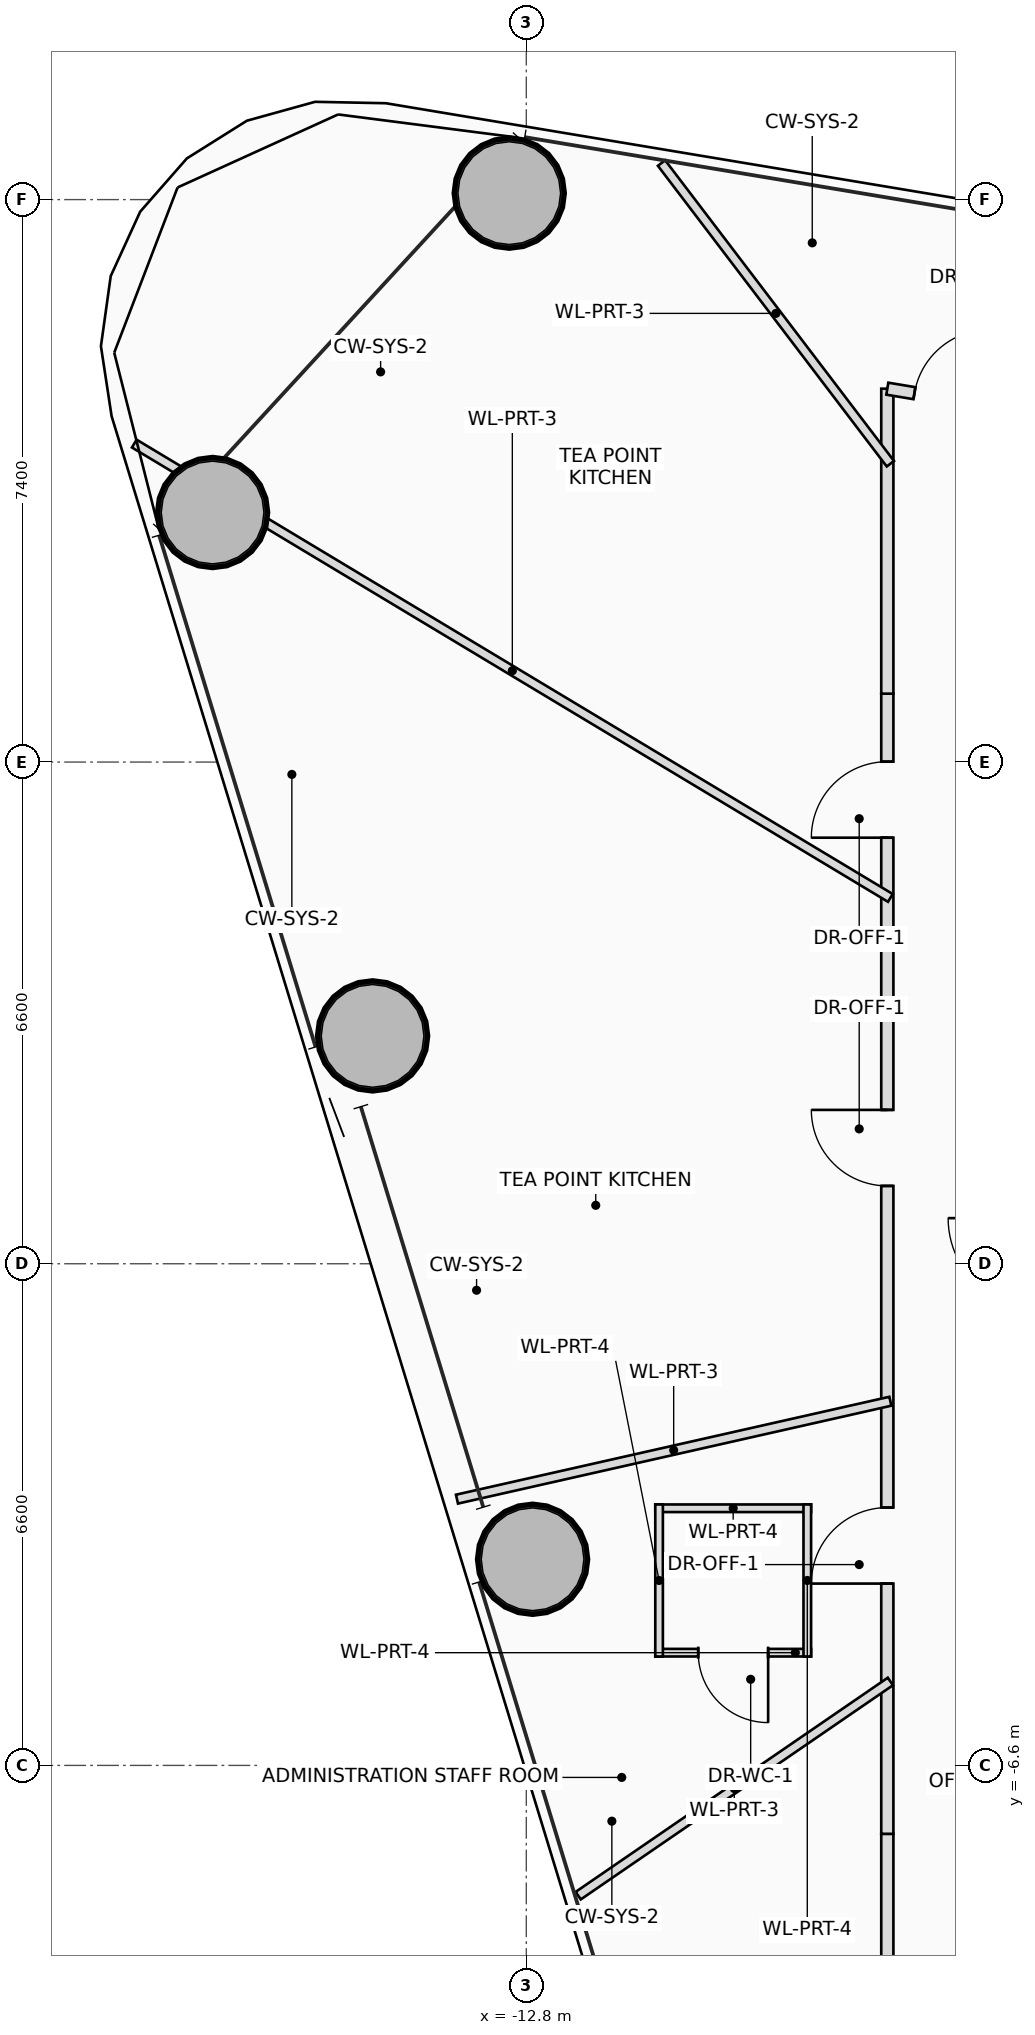
"""IFC4 building model, lengths in metres.
Left out: names, types, materials, properties, quantities, classifications, styles, units other than length and angle.
Written with IfcOpenShell. Run it as: python <this file> out.ifc"""

import sys

from ifc_helpers import new_model, si_unit, direction, frame, frame_2d, origin, origin_2d, place, context, subcontext, project, spatial, rectangle, hollow_circle, extrude, source, transform, mapped, element, fill, save


model = new_model("IFC4")
c1 = context("Model", 3, precision=1e-05, world=origin(), true_north=direction((0.0, 1.0)))
c2 = subcontext(c1, "Body", "Model", "MODEL_VIEW")
j1 = project(units=[si_unit("LENGTHUNIT", "METRE"), si_unit("PLANEANGLEUNIT", "RADIAN")], contexts=[c1])
p1 = place(None, origin())
s1 = spatial("IfcSite", under=j1, at=p1, CompositionType="ELEMENT")
p2 = place(p1, origin())
s2 = spatial("IfcBuilding", under=s1, at=p2, CompositionType="ELEMENT")
p3 = place(p2, frame((0.0, 0.0, 89.9)))
s3 = spatial("IfcBuildingStorey", under=s2, at=p3, CompositionType="ELEMENT", Elevation=89.9)
m1 = source(origin(), c2, "Body", "SweptSolid", [
    extrude(hollow_circle(Radius=0.725, WallThickness=0.05, at=origin_2d()), origin(), (0.0, 0.0, 1.0), 3.75),
])
for number, where, z_axis, x_axis in (
    (1, (-13.024, 14.085, 0.0), (0.0, 0.0, 1.0), (1.0, 0.0, 0.0)),
    (2, (-16.927, 9.883, 0.0), (0.0, 0.0, 1.0), (1.0, 0.0, 0.0)),
    (3, (-14.823, 2.998, 0.0), (0.0, 0.0, 1.0), (1.0, 0.0, 0.0)),
    (4, (-12.717, -3.888, 0.0), (0.0, 0.0, 1.0), (1.0, 0.0, 0.0)),
):
    element("IfcColumn", number, at=place(p3, frame(where, z_axis=z_axis, x_axis=x_axis)), inside=s3, PredefinedType="COLUMN", context=c2, shape_type="MappedRepresentation", body=[
        mapped(m1, transform((0.0, 0.0, 0.0), scale=1.0)),
    ])
p4 = place(p3, frame((-11.103, -3.217, 0.0), z_axis=(0.0, 0.0, 1.0), x_axis=(1.0, 0.0, 0.0)))
e5 = element("IfcWall", 5, at=p4, inside=s3, PredefinedType="PARTITIONING", context=c2, shape_type="SweptSolid", body=[
    extrude(rectangle(XDim=2.05, YDim=0.1, at=frame_2d((1.025, 0.0))), origin(), (0.0, 0.0, 1.0), 3.05),
])
p5 = place(p3, frame((-9.053, -5.117, 0.0), z_axis=(0.0, 0.0, 1.0), x_axis=(-1.0, 0.0, 0.0)))
e6 = element("IfcWall", 6, at=p5, inside=s3, PredefinedType="PARTITIONING", context=c2, shape_type="SweptSolid", body=[
    extrude(rectangle(XDim=2.05, YDim=0.1, at=frame_2d((1.025, 0.0))), origin(), (0.0, 0.0, 1.0), 3.05),
])
p6 = place(p5, frame((0.565, 0.0, 0.0)))
e7 = element("IfcOpeningElement", 7, at=p6, cuts=e6, PredefinedType="OPENING", context=c2, shape_type="SweptSolid", body=[
    extrude(rectangle(XDim=0.92, YDim=2.1, at=frame_2d((0.46, 1.05))), frame((0.0, 0.06, 0.0), z_axis=(0.0, -1.0, 0.0), x_axis=(1.0, 0.0, 0.0)), (0.0, 0.0, 1.0), 0.12),
])
for number, where, z_axis, x_axis in (
    (8, (-9.103, -3.167, 0.0), (0.0, 0.0, 1.0), (0.0, -1.0, 0.0)),
    (9, (-11.053, -5.167, 0.0), (0.0, 0.0, 1.0), (0.0, 1.0, 0.0)),
):
    element("IfcWall", number, at=place(p3, frame(where, z_axis=z_axis, x_axis=x_axis)), inside=s3, PredefinedType="PARTITIONING", context=c2, shape_type="SweptSolid", body=[
        extrude(rectangle(XDim=2.0, YDim=0.1, at=frame_2d((1.0, 0.0))), origin(), (0.0, 0.0, 1.0), 2.85),
    ])
p7 = place(p3, frame((-8.05, -13.271, 0.0), z_axis=(0.0, 0.0, 1.0), x_axis=(0.0, 1.0, 0.0)))
e10 = element("IfcWall", 10, at=p7, inside=s3, PredefinedType="PARTITIONING", context=c2, shape_type="SweptSolid", body=[
    extrude(rectangle(XDim=5.771, YDim=0.16, at=frame_2d((2.885, 0.0))), origin(), (0.0, 0.0, 1.0), 2.85),
])
p8 = place(p3, frame((-8.05, -7.5, 0.0), z_axis=(0.0, 0.0, 1.0), x_axis=(0.0, 1.0, 0.0)))
e11 = element("IfcWall", 11, at=p8, inside=s3, PredefinedType="PARTITIONING", context=c2, shape_type="SweptSolid", body=[
    extrude(rectangle(XDim=15.0, YDim=0.16, at=frame_2d((7.5, 0.0))), origin(), (0.0, 0.0, 1.0), 2.85),
])
p9 = place(p8, frame((3.292, 0.0, 0.0)))
e12 = element("IfcOpeningElement", 12, at=p9, cuts=e11, PredefinedType="OPENING", context=c2, shape_type="SweptSolid", body=[
    extrude(rectangle(XDim=1.0, YDim=2.25, at=frame_2d((0.5, 1.125))), frame((0.0, 0.09, 0.0), z_axis=(0.0, -1.0, 0.0), x_axis=(1.0, 0.0, 0.0)), (0.0, 0.0, 1.0), 0.18),
])
p10 = place(p8, frame((8.524, 0.0, 0.0)))
e13 = element("IfcOpeningElement", 13, at=p10, cuts=e11, PredefinedType="OPENING", context=c2, shape_type="SweptSolid", body=[
    extrude(rectangle(XDim=1.0, YDim=2.25, at=frame_2d((0.5, 1.125))), frame((0.0, 0.09, 0.0), z_axis=(0.0, -1.0, 0.0), x_axis=(1.0, 0.0, 0.0)), (0.0, 0.0, 1.0), 0.18),
])
p11 = place(p8, frame((13.105, 0.0, 0.0)))
e14 = element("IfcOpeningElement", 14, at=p11, cuts=e11, PredefinedType="OPENING", context=c2, shape_type="SweptSolid", body=[
    extrude(rectangle(XDim=1.0, YDim=2.25, at=frame_2d((0.5, 1.125))), frame((0.0, 0.09, 0.0), z_axis=(0.0, -1.0, 0.0), x_axis=(1.0, 0.0, 0.0)), (0.0, 0.0, 1.0), 0.18),
])
p12 = place(p3, frame((-8.05, 7.5, 0.0), z_axis=(0.0, 0.0, 1.0), x_axis=(0.0, 1.0, 0.0)))
e15 = element("IfcWall", 15, at=p12, inside=s3, PredefinedType="PARTITIONING", context=c2, shape_type="SweptSolid", body=[
    extrude(rectangle(XDim=4.012, YDim=0.16, at=frame_2d((2.006, 0.0))), origin(), (0.0, 0.0, 1.0), 2.85),
])
p13 = place(p3, frame((-8.05, 11.512, 0.0), z_axis=(0.0, 0.0, 1.0), x_axis=(0.986405407683, -0.164330069354, 0.0)))
e16 = element("IfcWall", 16, at=p13, inside=s3, PredefinedType="PARTITIONING", context=c2, shape_type="SweptSolid", body=[
    extrude(rectangle(XDim=1.723, YDim=0.16, at=frame_2d((0.862, 0.0))), origin(), (0.0, 0.0, 1.0), 3.545),
])
p14 = place(p13, frame((0.362, 0.0, 0.0)))
e17 = element("IfcOpeningElement", 17, at=p14, cuts=e16, PredefinedType="OPENING", context=c2, shape_type="SweptSolid", body=[
    extrude(rectangle(XDim=1.0, YDim=2.25, at=frame_2d((0.5, 1.125))), frame((0.0, 0.09, 0.0), z_axis=(0.0, -1.0, 0.0), x_axis=(1.0, 0.0, 0.0)), (0.0, 0.0, 1.0), 0.18),
])
p15 = place(p3, frame((-8.01, 4.813, 0.0), z_axis=(0.0, 0.0, 1.0), x_axis=(-0.857173493242, 0.515027768653, 0.0)))
e18 = element("IfcWall", 18, at=p15, inside=s3, PredefinedType="PARTITIONING", context=c2, shape_type="SweptSolid", body=[
    extrude(rectangle(XDim=11.605, YDim=0.12, at=frame_2d((5.803, 0.0))), origin(), (0.0, 0.0, 1.0), 2.85),
])
p16 = place(p3, frame((-8.01, -1.809, 0.0), z_axis=(0.0, 0.0, 1.0), x_axis=(-0.975429422211, -0.220312147384, 0.0)))
e19 = element("IfcWall", 19, at=p16, inside=s3, PredefinedType="PARTITIONING", context=c2, shape_type="SweptSolid", body=[
    extrude(rectangle(XDim=5.845, YDim=0.12, at=frame_2d((2.923, 0.0))), origin(), (0.0, 0.0, 1.0), 3.01),
])
p17 = place(p3, frame((-8.01, -5.496, 0.0), z_axis=(0.0, 0.0, 1.0), x_axis=(-0.824586433319, -0.565735993186, 0.0)))
e20 = element("IfcWall", 20, at=p17, inside=s3, PredefinedType="PARTITIONING", context=c2, shape_type="SweptSolid", body=[
    extrude(rectangle(XDim=4.981, YDim=0.12, at=frame_2d((2.49, 0.0))), origin(), (0.0, 0.0, 1.0), 3.01),
])
p18 = place(p3, frame((-8.01, 10.525, 0.0), z_axis=(0.0, 0.0, 1.0), x_axis=(-0.605587414203, 0.79577879072, 0.0)))
e21 = element("IfcWall", 21, at=p18, inside=s3, PredefinedType="PARTITIONING", context=c2, shape_type="SweptSolid", body=[
    extrude(rectangle(XDim=4.972, YDim=0.12, at=frame_2d((2.486, 0.0))), origin(), (0.0, 0.0, 1.0), 3.01),
])
p19 = place(p6, origin())
e22 = element("IfcDoor", 22, at=p19, inside=s3, OperationType="SINGLE_SWING_LEFT", PredefinedType="DOOR", context=c2, shape_type="SweptSolid", body=[
    extrude(rectangle(XDim=0.92, YDim=2.1, at=frame_2d((0.46, 1.05))), frame((0.0, 0.025, 0.0), z_axis=(0.0, -1.0, 0.0), x_axis=(1.0, 0.0, 0.0)), (0.0, 0.0, 1.0), 0.05),
])
fill(e7, e22)
p20 = place(p9, origin())
e23 = element("IfcDoor", 23, at=p20, inside=s3, OperationType="SINGLE_SWING_LEFT", PredefinedType="DOOR", context=c2, shape_type="SweptSolid", body=[
    extrude(rectangle(XDim=1.0, YDim=2.25, at=frame_2d((0.5, 1.125))), frame((0.0, 0.025, 0.0), z_axis=(0.0, -1.0, 0.0), x_axis=(1.0, 0.0, 0.0)), (0.0, 0.0, 1.0), 0.05),
])
fill(e12, e23)
p21 = place(p10, origin())
e24 = element("IfcDoor", 24, at=p21, inside=s3, OperationType="SINGLE_SWING_RIGHT", PredefinedType="DOOR", context=c2, shape_type="SweptSolid", body=[
    extrude(rectangle(XDim=1.0, YDim=2.25, at=frame_2d((0.5, 1.125))), frame((0.0, 0.025, 0.0), z_axis=(0.0, -1.0, 0.0), x_axis=(1.0, 0.0, 0.0)), (0.0, 0.0, 1.0), 0.05),
])
fill(e13, e24)
p22 = place(p11, origin())
e25 = element("IfcDoor", 25, at=p22, inside=s3, OperationType="SINGLE_SWING_LEFT", PredefinedType="DOOR", context=c2, shape_type="SweptSolid", body=[
    extrude(rectangle(XDim=1.0, YDim=2.25, at=frame_2d((0.5, 1.125))), frame((0.0, 0.025, 0.0), z_axis=(0.0, -1.0, 0.0), x_axis=(1.0, 0.0, 0.0)), (0.0, 0.0, 1.0), 0.05),
])
fill(e14, e25)
p23 = place(p14, origin())
e26 = element("IfcDoor", 26, at=p23, inside=s3, OperationType="SINGLE_SWING_RIGHT", PredefinedType="DOOR", context=c2, shape_type="SweptSolid", body=[
    extrude(rectangle(XDim=1.0, YDim=2.25, at=frame_2d((0.5, 1.125))), frame((0.0, 0.025, 0.0), z_axis=(0.0, -1.0, 0.0), x_axis=(1.0, 0.0, 0.0)), (0.0, 0.0, 1.0), 0.05),
])
fill(e17, e26)
save(model, sys.argv[1])
